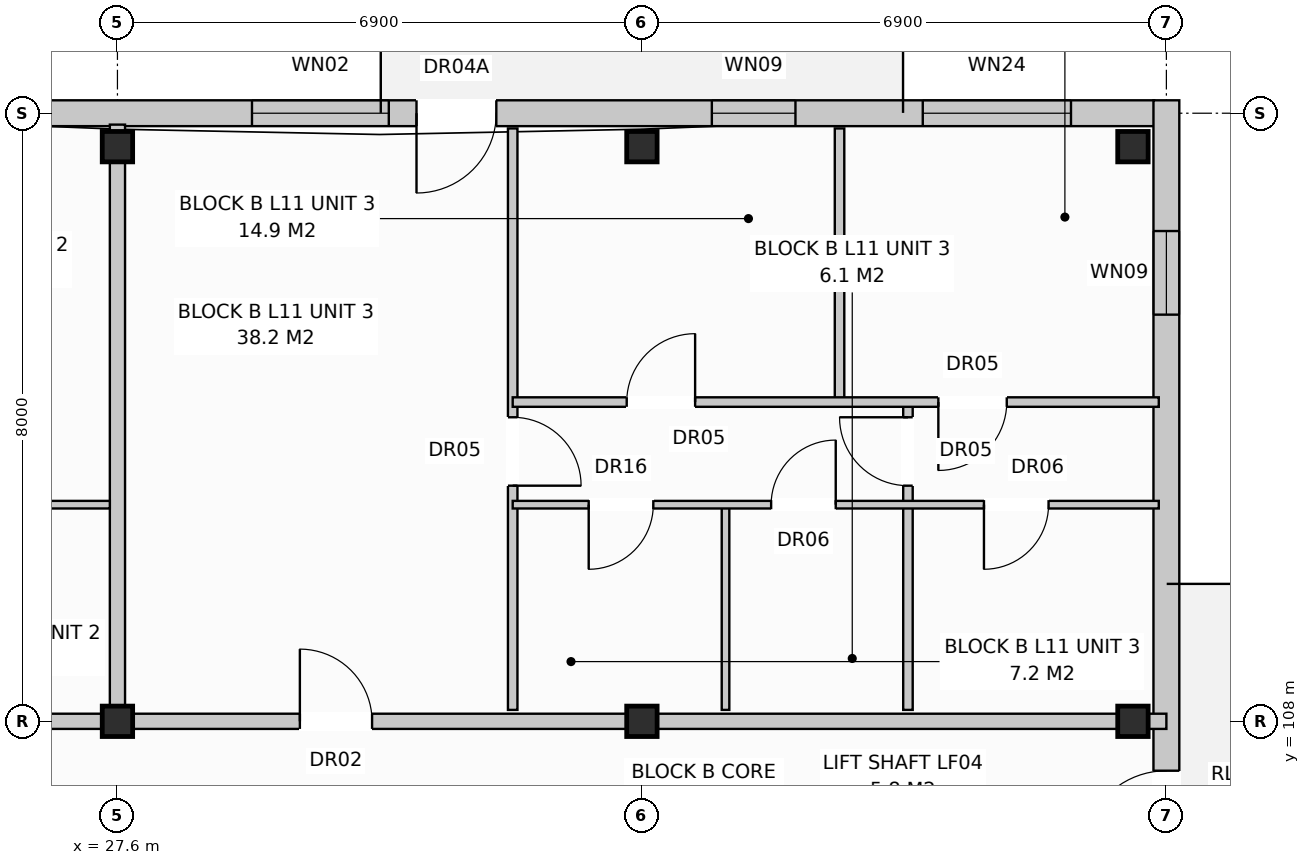
"""IFC4 building model, lengths in metres.
Left out: names, types, materials, properties, quantities, classifications, styles, units other than length and angle.
Written with IfcOpenShell. Run it as: python <this file> out.ifc"""

import sys

from ifc_helpers import new_model, si_unit, direction, frame, frame_2d, origin, origin_with_axes, origin_2d, place, context, subcontext, project, spatial, rectangle, extrude, element, fill, save


model = new_model("IFC4")
c1 = context("Model", 3, precision=1e-05, world=origin(), true_north=direction((0.0, 1.0)))
c2 = subcontext(c1, "Body", "Model", "MODEL_VIEW")
j1 = project(units=[si_unit("LENGTHUNIT", "METRE"), si_unit("PLANEANGLEUNIT", "RADIAN")], contexts=[c1])
p1 = place(None, origin())
s1 = spatial("IfcSite", under=j1, at=p1, CompositionType="ELEMENT")
p2 = place(p1, origin())
s2 = spatial("IfcBuilding", under=s1, at=p2, CompositionType="ELEMENT")
p3 = place(p2, frame((0.0, 0.0, 36.8)))
s3 = spatial("IfcBuildingStorey", under=s2, at=p3, CompositionType="ELEMENT", Elevation=36.8)
for number, where, z_axis, x_axis in (
    (1, (27.6, 108.0, 0.0), (0.0, 0.0, 1.0), (1.0, 0.0, 0.0)),
    (2, (27.6, 115.56, 0.0), (0.0, 0.0, 1.0), (1.0, 0.0, 0.0)),
    (3, (34.5, 108.0, 0.0), (0.0, 0.0, 1.0), (1.0, 0.0, 0.0)),
    (4, (34.5, 115.56, 0.0), (0.0, 0.0, 1.0), (1.0, 0.0, 0.0)),
    (5, (40.96, 108.0, 0.0), (0.0, 0.0, 1.0), (1.0, 0.0, 0.0)),
    (6, (40.96, 115.56, 0.0), (0.0, 0.0, 1.0), (1.0, 0.0, 0.0)),
):
    element("IfcColumn", number, at=place(p3, frame(where, z_axis=z_axis, x_axis=x_axis)), inside=s3, PredefinedType="COLUMN", context=c2, shape_type="SweptSolid", body=[
        extrude(rectangle(XDim=0.4, YDim=0.4, at=origin_2d()), origin(), (0.0, 0.0, 1.0), 3.2),
    ])
p4 = place(p3, frame((0.16, 116.0, 0.0), z_axis=(0.0, 0.0, 1.0), x_axis=(1.0, 0.0, 0.0)))
e7 = element("IfcWall", 7, at=p4, inside=s3, PredefinedType="STANDARD", context=c2, shape_type="SweptSolid", body=[
    extrude(rectangle(XDim=41.08, YDim=0.34, at=frame_2d((20.54, 0.0))), origin(), (0.0, 0.0, 1.0), 2.97),
])
p5 = place(p4, frame((5.06, 0.0, 0.0)))
e8 = element("IfcOpeningElement", 8, at=p5, cuts=e7, PredefinedType="OPENING", context=c2, shape_type="SweptSolid", body=[
    extrude(rectangle(XDim=1.05, YDim=2.12, at=frame_2d((0.525, 1.06))), frame((0.0, 0.182, 0.0), z_axis=(0.0, -1.0, 0.0), x_axis=(1.0, 0.0, 0.0)), (0.0, 0.0, 1.0), 0.364),
])
p6 = place(p4, frame((18.86, 0.0, 0.0)))
e9 = element("IfcOpeningElement", 9, at=p6, cuts=e7, PredefinedType="OPENING", context=c2, shape_type="SweptSolid", body=[
    extrude(rectangle(XDim=1.05, YDim=2.12, at=frame_2d((0.525, 1.06))), frame((0.0, 0.182, 0.0), z_axis=(0.0, -1.0, 0.0), x_axis=(1.0, 0.0, 0.0)), (0.0, 0.0, 1.0), 0.364),
])
p7 = place(p4, frame((31.375, 0.0, 0.0)))
e10 = element("IfcOpeningElement", 10, at=p7, cuts=e7, PredefinedType="OPENING", context=c2, shape_type="SweptSolid", body=[
    extrude(rectangle(XDim=1.05, YDim=2.12, at=frame_2d((0.525, 1.06))), frame((0.0, 0.182, 0.0), z_axis=(0.0, -1.0, 0.0), x_axis=(1.0, 0.0, 0.0)), (0.0, 0.0, 1.0), 0.364),
])
p8 = place(p4, frame((1.06, 0.0, 0.8)))
e11 = element("IfcOpeningElement", 11, at=p8, cuts=e7, PredefinedType="OPENING", context=c2, shape_type="SweptSolid", body=[
    extrude(rectangle(XDim=1.9, YDim=1.85, at=frame_2d((0.95, 0.925))), frame((0.0, 0.182, 0.0), z_axis=(0.0, -1.0, 0.0), x_axis=(1.0, 0.0, 0.0)), (0.0, 0.0, 1.0), 0.364),
])
p9 = place(p4, frame((9.36, 0.0, 0.72)))
e12 = element("IfcOpeningElement", 12, at=p9, cuts=e7, PredefinedType="OPENING", context=c2, shape_type="SweptSolid", body=[
    extrude(rectangle(XDim=1.1, YDim=1.5, at=frame_2d((0.55, 0.75))), frame((0.0, 0.182, 0.0), z_axis=(0.0, -1.0, 0.0), x_axis=(1.0, 0.0, 0.0)), (0.0, 0.0, 1.0), 0.364),
])
p10 = place(p4, frame((14.71, 0.0, 0.8)))
e13 = element("IfcOpeningElement", 13, at=p10, cuts=e7, PredefinedType="OPENING", context=c2, shape_type="SweptSolid", body=[
    extrude(rectangle(XDim=1.8, YDim=1.7, at=frame_2d((0.9, 0.85))), frame((0.0, 0.182, 0.0), z_axis=(0.0, -1.0, 0.0), x_axis=(1.0, 0.0, 0.0)), (0.0, 0.0, 1.0), 0.364),
])
p11 = place(p4, frame((21.46, 0.0, 0.72)))
e14 = element("IfcOpeningElement", 14, at=p11, cuts=e7, PredefinedType="OPENING", context=c2, shape_type="SweptSolid", body=[
    extrude(rectangle(XDim=1.1, YDim=1.5, at=frame_2d((0.55, 0.75))), frame((0.0, 0.182, 0.0), z_axis=(0.0, -1.0, 0.0), x_axis=(1.0, 0.0, 0.0)), (0.0, 0.0, 1.0), 0.364),
])
p12 = place(p4, frame((24.435, 0.0, 0.8)))
e15 = element("IfcOpeningElement", 15, at=p12, cuts=e7, PredefinedType="OPENING", context=c2, shape_type="SweptSolid", body=[
    extrude(rectangle(XDim=1.95, YDim=1.65, at=frame_2d((0.975, 0.825))), frame((0.0, 0.182, 0.0), z_axis=(0.0, -1.0, 0.0), x_axis=(1.0, 0.0, 0.0)), (0.0, 0.0, 1.0), 0.364),
])
p13 = place(p4, frame((29.21, 0.0, 0.8)))
e16 = element("IfcOpeningElement", 16, at=p13, cuts=e7, PredefinedType="OPENING", context=c2, shape_type="SweptSolid", body=[
    extrude(rectangle(XDim=1.8, YDim=1.7, at=frame_2d((0.9, 0.85))), frame((0.0, 0.182, 0.0), z_axis=(0.0, -1.0, 0.0), x_axis=(1.0, 0.0, 0.0)), (0.0, 0.0, 1.0), 0.364),
])
p14 = place(p4, frame((35.26, 0.0, 0.72)))
e17 = element("IfcOpeningElement", 17, at=p14, cuts=e7, PredefinedType="OPENING", context=c2, shape_type="SweptSolid", body=[
    extrude(rectangle(XDim=1.1, YDim=1.5, at=frame_2d((0.55, 0.75))), frame((0.0, 0.182, 0.0), z_axis=(0.0, -1.0, 0.0), x_axis=(1.0, 0.0, 0.0)), (0.0, 0.0, 1.0), 0.364),
])
p15 = place(p4, frame((38.035, 0.0, 0.8)))
e18 = element("IfcOpeningElement", 18, at=p15, cuts=e7, PredefinedType="OPENING", context=c2, shape_type="SweptSolid", body=[
    extrude(rectangle(XDim=1.95, YDim=1.65, at=frame_2d((0.975, 0.825))), frame((0.0, 0.182, 0.0), z_axis=(0.0, -1.0, 0.0), x_axis=(1.0, 0.0, 0.0)), (0.0, 0.0, 1.0), 0.364),
])
p16 = place(p3, frame((41.4, 97.43, 0.0), z_axis=(0.0, 0.0, 1.0), x_axis=(0.0, 1.0, 0.0)))
e19 = element("IfcWall", 19, at=p16, inside=s3, PredefinedType="STANDARD", context=c2, shape_type="SweptSolid", body=[
    extrude(rectangle(XDim=18.74, YDim=0.34, at=frame_2d((9.37, 0.0))), origin(), (0.0, 0.0, 1.0), 2.97),
])
p17 = place(p16, frame((8.82, 0.0, 0.0)))
e20 = element("IfcOpeningElement", 20, at=p17, cuts=e19, PredefinedType="OPENING", context=c2, shape_type="SweptSolid", body=[
    extrude(rectangle(XDim=1.1, YDim=2.1, at=frame_2d((0.55, 1.05))), frame((0.0, 0.182, 0.0), z_axis=(0.0, -1.0, 0.0), x_axis=(1.0, 0.0, 0.0)), (0.0, 0.0, 1.0), 0.364),
])
p18 = place(p16, frame((1.72, 0.0, 0.72)))
e21 = element("IfcOpeningElement", 21, at=p18, cuts=e19, PredefinedType="OPENING", context=c2, shape_type="SweptSolid", body=[
    extrude(rectangle(XDim=1.1, YDim=1.5, at=frame_2d((0.55, 0.75))), frame((0.0, 0.182, 0.0), z_axis=(0.0, -1.0, 0.0), x_axis=(1.0, 0.0, 0.0)), (0.0, 0.0, 1.0), 0.364),
])
p19 = place(p16, frame((15.92, 0.0, 0.72)))
e22 = element("IfcOpeningElement", 22, at=p19, cuts=e19, PredefinedType="OPENING", context=c2, shape_type="SweptSolid", body=[
    extrude(rectangle(XDim=1.1, YDim=1.5, at=frame_2d((0.55, 0.75))), frame((0.0, 0.182, 0.0), z_axis=(0.0, -1.0, 0.0), x_axis=(1.0, 0.0, 0.0)), (0.0, 0.0, 1.0), 0.364),
])
p20 = place(p3, frame((27.6, 108.15, 0.0), z_axis=(0.0, 0.0, 1.0), x_axis=(0.0, 1.0, 0.0)))
e23 = element("IfcWall", 23, at=p20, inside=s3, PredefinedType="PARTITIONING", context=c2, shape_type="SweptSolid", body=[
    extrude(rectangle(XDim=7.7, YDim=0.2, at=frame_2d((3.85, 0.0))), origin(), (0.0, 0.0, 1.0), 2.97),
])
p21 = place(p3, frame((6.9, 108.0, 0.0), z_axis=(0.0, 0.0, 1.0), x_axis=(1.0, 0.0, 0.0)))
e24 = element("IfcWall", 24, at=p21, inside=s3, PredefinedType="PARTITIONING", context=c2, shape_type="SweptSolid", body=[
    extrude(rectangle(XDim=20.7, YDim=0.2, at=frame_2d((10.35, 0.0))), origin(), (0.0, 0.0, 1.0), 2.41),
])
p22 = place(p21, frame((2.4, 0.0, 0.0)))
e25 = element("IfcOpeningElement", 25, at=p22, cuts=e24, PredefinedType="OPENING", context=c2, shape_type="SweptSolid", body=[
    extrude(rectangle(XDim=0.95, YDim=2.15, at=frame_2d((0.475, 1.075))), frame((0.0, 0.112, 0.0), z_axis=(0.0, -1.0, 0.0), x_axis=(1.0, 0.0, 0.0)), (0.0, 0.0, 1.0), 0.224),
])
p23 = place(p3, frame((13.2, 110.85, 0.0), z_axis=(0.0, 0.0, 1.0), x_axis=(1.0, 0.0, 0.0)))
e26 = element("IfcWall", 26, at=p23, inside=s3, PredefinedType="PARTITIONING", context=c2, shape_type="SweptSolid", body=[
    extrude(rectangle(XDim=14.3, YDim=0.1, at=frame_2d((7.15, 0.0))), origin(), (0.0, 0.0, 1.0), 2.97),
])
p24 = place(p23, frame((1.6, 0.0, 0.0)))
e27 = element("IfcOpeningElement", 27, at=p24, cuts=e26, PredefinedType="OPENING", context=c2, shape_type="SweptSolid", body=[
    extrude(rectangle(XDim=0.9, YDim=2.1, at=frame_2d((0.45, 1.05))), frame((0.0, 0.062, 0.0), z_axis=(0.0, -1.0, 0.0), x_axis=(1.0, 0.0, 0.0)), (0.0, 0.0, 1.0), 0.124),
])
p25 = place(p23, frame((5.1, 0.0, 0.0)))
e28 = element("IfcOpeningElement", 28, at=p25, cuts=e26, PredefinedType="OPENING", context=c2, shape_type="SweptSolid", body=[
    extrude(rectangle(XDim=0.85, YDim=2.05, at=frame_2d((0.425, 1.025))), frame((0.0, 0.062, 0.0), z_axis=(0.0, -1.0, 0.0), x_axis=(1.0, 0.0, 0.0)), (0.0, 0.0, 1.0), 0.124),
])
p26 = place(p23, frame((8.2, 0.0, 0.0)))
e29 = element("IfcOpeningElement", 29, at=p26, cuts=e26, PredefinedType="OPENING", context=c2, shape_type="SweptSolid", body=[
    extrude(rectangle(XDim=0.85, YDim=2.05, at=frame_2d((0.425, 1.025))), frame((0.0, 0.062, 0.0), z_axis=(0.0, -1.0, 0.0), x_axis=(1.0, 0.0, 0.0)), (0.0, 0.0, 1.0), 0.124),
])
p27 = place(p23, frame((11.6, 0.0, 0.0)))
e30 = element("IfcOpeningElement", 30, at=p27, cuts=e26, PredefinedType="OPENING", context=c2, shape_type="SweptSolid", body=[
    extrude(rectangle(XDim=0.85, YDim=2.05, at=frame_2d((0.425, 1.025))), frame((0.0, 0.062, 0.0), z_axis=(0.0, -1.0, 0.0), x_axis=(1.0, 0.0, 0.0)), (0.0, 0.0, 1.0), 0.124),
])
p28 = place(p3, frame((27.6, 108.0, 0.0), z_axis=(0.0, 0.0, 1.0), x_axis=(1.0, 0.0, 0.0)))
e31 = element("IfcWall", 31, at=p28, inside=s3, PredefinedType="PARTITIONING", context=c2, shape_type="SweptSolid", body=[
    extrude(rectangle(XDim=13.8, YDim=0.2, at=frame_2d((6.9, 0.0))), origin(), (0.0, 0.0, 1.0), 2.41),
])
p29 = place(p28, frame((2.4, 0.0, 0.0)))
e32 = element("IfcOpeningElement", 32, at=p29, cuts=e31, PredefinedType="OPENING", context=c2, shape_type="SweptSolid", body=[
    extrude(rectangle(XDim=0.95, YDim=2.15, at=frame_2d((0.475, 1.075))), frame((0.0, 0.112, 0.0), z_axis=(0.0, -1.0, 0.0), x_axis=(1.0, 0.0, 0.0)), (0.0, 0.0, 1.0), 0.224),
])
p30 = place(p3, frame((32.8, 108.15, 0.0), z_axis=(0.0, 0.0, 1.0), x_axis=(0.0, 1.0, 0.0)))
e33 = element("IfcWall", 33, at=p30, inside=s3, PredefinedType="PARTITIONING", context=c2, shape_type="SweptSolid", body=[
    extrude(rectangle(XDim=7.65, YDim=0.125, at=frame_2d((3.825, 0.0))), origin(), (0.0, 0.0, 1.0), 2.97),
])
p31 = place(p30, frame((2.95, 0.0, 0.0)))
e34 = element("IfcOpeningElement", 34, at=p31, cuts=e33, PredefinedType="OPENING", context=c2, shape_type="SweptSolid", body=[
    extrude(rectangle(XDim=0.9, YDim=2.1, at=frame_2d((0.45, 1.05))), frame((0.0, 0.074, 0.0), z_axis=(0.0, -1.0, 0.0), x_axis=(1.0, 0.0, 0.0)), (0.0, 0.0, 1.0), 0.149),
])
p32 = place(p3, frame((35.6, 108.15, 0.0), z_axis=(0.0, 0.0, 1.0), x_axis=(0.0, 1.0, 0.0)))
e35 = element("IfcWall", 35, at=p32, inside=s3, PredefinedType="PARTITIONING", context=c2, shape_type="SweptSolid", body=[
    extrude(rectangle(XDim=2.7, YDim=0.1, at=frame_2d((1.35, 0.0))), origin(), (0.0, 0.0, 1.0), 2.97),
])
p33 = place(p3, frame((38.0, 108.15, 0.0), z_axis=(0.0, 0.0, 1.0), x_axis=(0.0, 1.0, 0.0)))
e36 = element("IfcWall", 36, at=p33, inside=s3, PredefinedType="PARTITIONING", context=c2, shape_type="SweptSolid", body=[
    extrude(rectangle(XDim=4.05, YDim=0.125, at=frame_2d((2.025, 0.0))), origin(), (0.0, 0.0, 1.0), 2.97),
])
p34 = place(p33, frame((2.95, 0.0, 0.0)))
e37 = element("IfcOpeningElement", 37, at=p34, cuts=e36, PredefinedType="OPENING", context=c2, shape_type="SweptSolid", body=[
    extrude(rectangle(XDim=0.9, YDim=2.1, at=frame_2d((0.45, 1.05))), frame((0.0, 0.074, 0.0), z_axis=(0.0, -1.0, 0.0), x_axis=(1.0, 0.0, 0.0)), (0.0, 0.0, 1.0), 0.149),
])
p35 = place(p3, frame((37.1, 112.2, 0.0), z_axis=(0.0, 0.0, 1.0), x_axis=(0.0, 1.0, 0.0)))
e38 = element("IfcWall", 38, at=p35, inside=s3, PredefinedType="PARTITIONING", context=c2, shape_type="SweptSolid", body=[
    extrude(rectangle(XDim=3.6, YDim=0.125, at=frame_2d((1.8, 0.0))), origin(), (0.0, 0.0, 1.0), 2.59),
])
p36 = place(p3, frame((32.8, 110.85, 0.0), z_axis=(0.0, 0.0, 1.0), x_axis=(1.0, 0.0, 0.0)))
e39 = element("IfcWall", 39, at=p36, inside=s3, PredefinedType="PARTITIONING", context=c2, shape_type="SweptSolid", body=[
    extrude(rectangle(XDim=8.5, YDim=0.1, at=frame_2d((4.25, 0.0))), origin(), (0.0, 0.0, 1.0), 2.97),
])
p37 = place(p36, frame((1.0, 0.0, 0.0)))
e40 = element("IfcOpeningElement", 40, at=p37, cuts=e39, PredefinedType="OPENING", context=c2, shape_type="SweptSolid", body=[
    extrude(rectangle(XDim=0.85, YDim=2.1, at=frame_2d((0.425, 1.05))), frame((0.0, 0.062, 0.0), z_axis=(0.0, -1.0, 0.0), x_axis=(1.0, 0.0, 0.0)), (0.0, 0.0, 1.0), 0.124),
])
p38 = place(p36, frame((3.4, 0.0, 0.0)))
e41 = element("IfcOpeningElement", 41, at=p38, cuts=e39, PredefinedType="OPENING", context=c2, shape_type="SweptSolid", body=[
    extrude(rectangle(XDim=0.85, YDim=2.05, at=frame_2d((0.425, 1.025))), frame((0.0, 0.062, 0.0), z_axis=(0.0, -1.0, 0.0), x_axis=(1.0, 0.0, 0.0)), (0.0, 0.0, 1.0), 0.124),
])
p39 = place(p36, frame((6.2, 0.0, 0.0)))
e42 = element("IfcOpeningElement", 42, at=p39, cuts=e39, PredefinedType="OPENING", context=c2, shape_type="SweptSolid", body=[
    extrude(rectangle(XDim=0.85, YDim=2.05, at=frame_2d((0.425, 1.025))), frame((0.0, 0.062, 0.0), z_axis=(0.0, -1.0, 0.0), x_axis=(1.0, 0.0, 0.0)), (0.0, 0.0, 1.0), 0.124),
])
p40 = place(p3, frame((32.8, 112.2, 0.0), z_axis=(0.0, 0.0, 1.0), x_axis=(1.0, 0.0, 0.0)))
e43 = element("IfcWall", 43, at=p40, inside=s3, PredefinedType="PARTITIONING", context=c2, shape_type="SweptSolid", body=[
    extrude(rectangle(XDim=8.5, YDim=0.125, at=frame_2d((4.25, 0.0))), origin(), (0.0, 0.0, 1.0), 2.97),
])
p41 = place(p40, frame((1.5, 0.0, 0.0)))
e44 = element("IfcOpeningElement", 44, at=p41, cuts=e43, PredefinedType="OPENING", context=c2, shape_type="SweptSolid", body=[
    extrude(rectangle(XDim=0.9, YDim=2.1, at=frame_2d((0.45, 1.05))), frame((0.0, 0.074, 0.0), z_axis=(0.0, -1.0, 0.0), x_axis=(1.0, 0.0, 0.0)), (0.0, 0.0, 1.0), 0.149),
])
p42 = place(p40, frame((5.6, 0.0, 0.0)))
e45 = element("IfcOpeningElement", 45, at=p42, cuts=e43, PredefinedType="OPENING", context=c2, shape_type="SweptSolid", body=[
    extrude(rectangle(XDim=0.9, YDim=2.1, at=frame_2d((0.45, 1.05))), frame((0.0, 0.074, 0.0), z_axis=(0.0, -1.0, 0.0), x_axis=(1.0, 0.0, 0.0)), (0.0, 0.0, 1.0), 0.149),
])
p43 = place(p7, frame((1.05, 0.0, 0.0), z_axis=(0.0, 0.0, 1.0), x_axis=(-1.0, 0.0, 0.0)))
e46 = element("IfcDoor", 46, at=p43, inside=s3, OperationType="SINGLE_SWING_LEFT", PredefinedType="DOOR", context=c2, shape_type="SweptSolid", body=[
    extrude(rectangle(XDim=1.05, YDim=2.12, at=frame_2d((0.525, 1.06))), frame((0.0, 0.025, 0.0), z_axis=(0.0, -1.0, 0.0), x_axis=(1.0, 0.0, 0.0)), (0.0, 0.0, 1.0), 0.05),
])
fill(e10, e46)
p44 = place(p13, origin_with_axes())
e47 = element("IfcWindow", 47, at=p44, inside=s3, PartitioningType="SINGLE_PANEL", PredefinedType="WINDOW", context=c2, shape_type="SweptSolid", body=[
    extrude(rectangle(XDim=1.8, YDim=1.7, at=frame_2d((0.9, 0.85))), frame((0.0, 0.03, 0.0), z_axis=(0.0, -1.0, 0.0), x_axis=(1.0, 0.0, 0.0)), (0.0, 0.0, 1.0), 0.06),
])
fill(e16, e47)
p45 = place(p14, origin_with_axes())
e48 = element("IfcWindow", 48, at=p45, inside=s3, PartitioningType="SINGLE_PANEL", PredefinedType="WINDOW", context=c2, shape_type="SweptSolid", body=[
    extrude(rectangle(XDim=1.1, YDim=1.5, at=frame_2d((0.55, 0.75))), frame((0.0, 0.03, 0.0), z_axis=(0.0, -1.0, 0.0), x_axis=(1.0, 0.0, 0.0)), (0.0, 0.0, 1.0), 0.06),
])
fill(e17, e48)
p46 = place(p15, origin_with_axes())
e49 = element("IfcWindow", 49, at=p46, inside=s3, PartitioningType="SINGLE_PANEL", PredefinedType="WINDOW", context=c2, shape_type="SweptSolid", body=[
    extrude(rectangle(XDim=1.95, YDim=1.65, at=frame_2d((0.975, 0.825))), frame((0.0, 0.03, 0.0), z_axis=(0.0, -1.0, 0.0), x_axis=(1.0, 0.0, 0.0)), (0.0, 0.0, 1.0), 0.06),
])
fill(e18, e49)
p47 = place(p17, origin_with_axes())
e50 = element("IfcDoor", 50, at=p47, inside=s3, OperationType="SINGLE_SWING_LEFT", PredefinedType="DOOR", context=c2, shape_type="SweptSolid", body=[
    extrude(rectangle(XDim=1.1, YDim=2.1, at=frame_2d((0.55, 1.05))), frame((0.0, 0.025, 0.0), z_axis=(0.0, -1.0, 0.0), x_axis=(1.0, 0.0, 0.0)), (0.0, 0.0, 1.0), 0.05),
])
fill(e20, e50)
p48 = place(p19, origin_with_axes())
e51 = element("IfcWindow", 51, at=p48, inside=s3, PartitioningType="SINGLE_PANEL", PredefinedType="WINDOW", context=c2, shape_type="SweptSolid", body=[
    extrude(rectangle(XDim=1.1, YDim=1.5, at=frame_2d((0.55, 0.75))), frame((0.0, 0.03, 0.0), z_axis=(0.0, -1.0, 0.0), x_axis=(1.0, 0.0, 0.0)), (0.0, 0.0, 1.0), 0.06),
])
fill(e22, e51)
p49 = place(p29, origin_with_axes())
e52 = element("IfcDoor", 52, at=p49, inside=s3, OperationType="SINGLE_SWING_LEFT", PredefinedType="DOOR", context=c2, shape_type="SweptSolid", body=[
    extrude(rectangle(XDim=0.95, YDim=2.15, at=frame_2d((0.475, 1.075))), frame((0.0, 0.025, 0.0), z_axis=(0.0, -1.0, 0.0), x_axis=(1.0, 0.0, 0.0)), (0.0, 0.0, 1.0), 0.05),
])
fill(e32, e52)
p50 = place(p31, frame((0.9, 0.0, 0.0), z_axis=(0.0, 0.0, 1.0), x_axis=(-1.0, 0.0, 0.0)))
e53 = element("IfcDoor", 53, at=p50, inside=s3, OperationType="SINGLE_SWING_LEFT", PredefinedType="DOOR", context=c2, shape_type="SweptSolid", body=[
    extrude(rectangle(XDim=0.9, YDim=2.1, at=frame_2d((0.45, 1.05))), frame((0.0, 0.025, 0.0), z_axis=(0.0, -1.0, 0.0), x_axis=(1.0, 0.0, 0.0)), (0.0, 0.0, 1.0), 0.05),
])
fill(e34, e53)
p51 = place(p34, origin_with_axes())
e54 = element("IfcDoor", 54, at=p51, inside=s3, OperationType="SINGLE_SWING_RIGHT", PredefinedType="DOOR", context=c2, shape_type="SweptSolid", body=[
    extrude(rectangle(XDim=0.9, YDim=2.1, at=frame_2d((0.45, 1.05))), frame((0.0, 0.025, 0.0), z_axis=(0.0, -1.0, 0.0), x_axis=(1.0, 0.0, 0.0)), (0.0, 0.0, 1.0), 0.05),
])
fill(e37, e54)
p52 = place(p37, frame((0.85, 0.0, 0.0), z_axis=(0.0, 0.0, 1.0), x_axis=(-1.0, 0.0, 0.0)))
e55 = element("IfcDoor", 55, at=p52, inside=s3, OperationType="SINGLE_SWING_LEFT", PredefinedType="DOOR", context=c2, shape_type="SweptSolid", body=[
    extrude(rectangle(XDim=0.85, YDim=2.1, at=frame_2d((0.425, 1.05))), frame((0.0, 0.025, 0.0), z_axis=(0.0, -1.0, 0.0), x_axis=(1.0, 0.0, 0.0)), (0.0, 0.0, 1.0), 0.05),
])
fill(e40, e55)
p53 = place(p38, origin_with_axes())
e56 = element("IfcDoor", 56, at=p53, inside=s3, OperationType="SINGLE_SWING_RIGHT", PredefinedType="DOOR", context=c2, shape_type="SweptSolid", body=[
    extrude(rectangle(XDim=0.85, YDim=2.05, at=frame_2d((0.425, 1.025))), frame((0.0, 0.025, 0.0), z_axis=(0.0, -1.0, 0.0), x_axis=(1.0, 0.0, 0.0)), (0.0, 0.0, 1.0), 0.05),
])
fill(e41, e56)
p54 = place(p39, frame((0.85, 0.0, 0.0), z_axis=(0.0, 0.0, 1.0), x_axis=(-1.0, 0.0, 0.0)))
e57 = element("IfcDoor", 57, at=p54, inside=s3, OperationType="SINGLE_SWING_LEFT", PredefinedType="DOOR", context=c2, shape_type="SweptSolid", body=[
    extrude(rectangle(XDim=0.85, YDim=2.05, at=frame_2d((0.425, 1.025))), frame((0.0, 0.025, 0.0), z_axis=(0.0, -1.0, 0.0), x_axis=(1.0, 0.0, 0.0)), (0.0, 0.0, 1.0), 0.05),
])
fill(e42, e57)
p55 = place(p41, origin_with_axes())
e58 = element("IfcDoor", 58, at=p55, inside=s3, OperationType="SINGLE_SWING_RIGHT", PredefinedType="DOOR", context=c2, shape_type="SweptSolid", body=[
    extrude(rectangle(XDim=0.9, YDim=2.1, at=frame_2d((0.45, 1.05))), frame((0.0, 0.025, 0.0), z_axis=(0.0, -1.0, 0.0), x_axis=(1.0, 0.0, 0.0)), (0.0, 0.0, 1.0), 0.05),
])
fill(e44, e58)
p56 = place(p42, frame((0.9, 0.0, 0.0), z_axis=(0.0, 0.0, 1.0), x_axis=(-1.0, 0.0, 0.0)))
e59 = element("IfcDoor", 59, at=p56, inside=s3, OperationType="SINGLE_SWING_LEFT", PredefinedType="DOOR", context=c2, shape_type="SweptSolid", body=[
    extrude(rectangle(XDim=0.9, YDim=2.1, at=frame_2d((0.45, 1.05))), frame((0.0, 0.025, 0.0), z_axis=(0.0, -1.0, 0.0), x_axis=(1.0, 0.0, 0.0)), (0.0, 0.0, 1.0), 0.05),
])
fill(e45, e59)
save(model, sys.argv[1])
